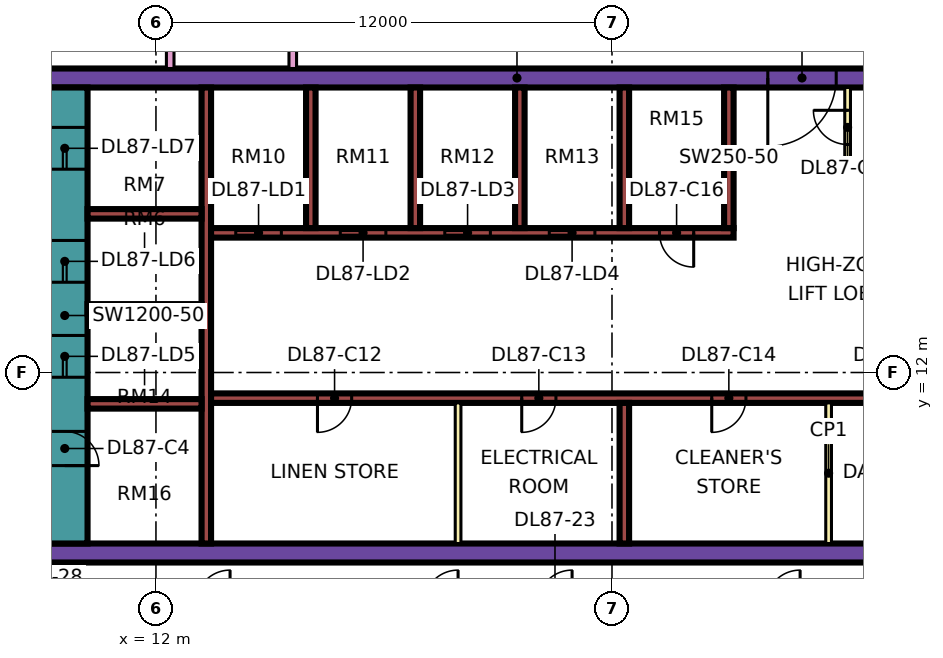
"""IFC4 building model, lengths in metres.
Left out: names, types, materials, properties, quantities, classifications, styles, units other than length and angle.
Written with IfcOpenShell. Run it as: python <this file> out.ifc"""

import sys

from ifc_helpers import new_model, si_unit, direction, frame, frame_2d, origin, place, context, subcontext, project, spatial, rectangle, extrude, element, fill, save


model = new_model("IFC4")
c1 = context("Model", 3, precision=1e-05, world=origin(), true_north=direction((0.0, 1.0)))
c2 = subcontext(c1, "Body", "Model", "MODEL_VIEW")
j1 = project(units=[si_unit("LENGTHUNIT", "METRE"), si_unit("PLANEANGLEUNIT", "RADIAN")], contexts=[c1])
p1 = place(None, origin())
s1 = spatial("IfcSite", under=j1, at=p1, CompositionType="ELEMENT")
p2 = place(p1, origin())
s2 = spatial("IfcBuilding", under=s1, at=p2, CompositionType="ELEMENT")
p3 = place(p2, frame((0.0, 0.0, 372.65)))
s3 = spatial("IfcBuildingStorey", under=s2, at=p3, CompositionType="ELEMENT", Elevation=372.65)
p4 = place(p3, frame((9.0, 7.25, 0.0), z_axis=(0.0, 0.0, 1.0), x_axis=(1.0, 0.0, 0.0)))
e1 = element("IfcWall", 1, at=p4, inside=s3, PredefinedType="SHEAR", context=c2, shape_type="SweptSolid", body=[
    extrude(rectangle(XDim=25.0, YDim=0.5, at=frame_2d((12.5, 0.0))), origin(), (0.0, 0.0, 1.0), 3.75),
])
p5 = place(p3, frame((9.0, 19.75, 0.0), z_axis=(0.0, 0.0, 1.0), x_axis=(1.0, 0.0, 0.0)))
e2 = element("IfcWall", 2, at=p5, inside=s3, PredefinedType="SHEAR", context=c2, shape_type="SweptSolid", body=[
    extrude(rectangle(XDim=25.0, YDim=0.5, at=frame_2d((12.5, 0.0))), origin(), (0.0, 0.0, 1.0), 3.75),
])
p6 = place(p5, frame((19.1, 0.0, 0.0)))
e3 = element("IfcOpeningElement", 3, at=p6, cuts=e2, PredefinedType="OPENING", context=c2, shape_type="SweptSolid", body=[
    extrude(rectangle(XDim=1.8, YDim=2.4, at=frame_2d((0.9, 1.2))), frame((0.0, 0.26, 0.0), z_axis=(0.0, -1.0, 0.0), x_axis=(1.0, 0.0, 0.0)), (0.0, 0.0, 1.0), 0.52),
])
p7 = place(p3, frame((9.6, 7.5, 0.0), z_axis=(0.0, 0.0, 1.0), x_axis=(0.0, 1.0, 0.0)))
e4 = element("IfcWall", 4, at=p7, inside=s3, PredefinedType="SHEAR", context=c2, shape_type="SweptSolid", body=[
    extrude(rectangle(XDim=12.0, YDim=1.2, at=frame_2d((6.0, 0.0))), origin(), (0.0, 0.0, 1.0), 3.75),
])
p8 = place(p7, frame((4.375, 0.0, 0.0)))
e5 = element("IfcOpeningElement", 5, at=p8, cuts=e4, PredefinedType="OPENING", context=c2, shape_type="SweptSolid", body=[
    extrude(rectangle(XDim=1.1, YDim=2.2, at=frame_2d((0.55, 1.1))), frame((0.0, 0.61, 0.0), z_axis=(0.0, -1.0, 0.0), x_axis=(1.0, 0.0, 0.0)), (0.0, 0.0, 1.0), 1.22),
])
p9 = place(p7, frame((6.875, 0.0, 0.0)))
e6 = element("IfcOpeningElement", 6, at=p9, cuts=e4, PredefinedType="OPENING", context=c2, shape_type="SweptSolid", body=[
    extrude(rectangle(XDim=1.1, YDim=2.2, at=frame_2d((0.55, 1.1))), frame((0.0, 0.61, 0.0), z_axis=(0.0, -1.0, 0.0), x_axis=(1.0, 0.0, 0.0)), (0.0, 0.0, 1.0), 1.22),
])
p10 = place(p7, frame((9.85, 0.0, 0.0)))
e7 = element("IfcOpeningElement", 7, at=p10, cuts=e4, PredefinedType="OPENING", context=c2, shape_type="SweptSolid", body=[
    extrude(rectangle(XDim=1.1, YDim=2.2, at=frame_2d((0.55, 1.1))), frame((0.0, 0.61, 0.0), z_axis=(0.0, -1.0, 0.0), x_axis=(1.0, 0.0, 0.0)), (0.0, 0.0, 1.0), 1.22),
])
p11 = place(p7, frame((2.05, 0.0, 0.0)))
e8 = element("IfcOpeningElement", 8, at=p11, cuts=e4, PredefinedType="OPENING", context=c2, shape_type="SweptSolid", body=[
    extrude(rectangle(XDim=0.9, YDim=2.1, at=frame_2d((0.45, 1.05))), frame((0.0, 0.61, 0.0), z_axis=(0.0, -1.0, 0.0), x_axis=(1.0, 0.0, 0.0)), (0.0, 0.0, 1.0), 1.22),
])
p12 = place(p3, frame((13.325, 7.5, 0.0), z_axis=(0.0, 0.0, 1.0), x_axis=(0.0, 1.0, 0.0)))
e9 = element("IfcWall", 9, at=p12, inside=s3, PredefinedType="SHEAR", context=c2, shape_type="SweptSolid", body=[
    extrude(rectangle(XDim=12.0, YDim=0.25, at=frame_2d((6.0, 0.0))), origin(), (0.0, 0.0, 1.0), 3.75),
])
p13 = place(p3, frame((13.45, 11.325, 0.0), z_axis=(0.0, 0.0, 1.0), x_axis=(1.0, 0.0, 0.0)))
e10 = element("IfcWall", 10, at=p13, inside=s3, PredefinedType="SHEAR", context=c2, shape_type="SweptSolid", body=[
    extrude(rectangle(XDim=20.05, YDim=0.25, at=frame_2d((10.025, 0.0))), origin(), (0.0, 0.0, 1.0), 3.75),
])
p14 = place(p13, frame((2.8, 0.0, 0.0)))
e11 = element("IfcOpeningElement", 11, at=p14, cuts=e10, PredefinedType="OPENING", context=c2, shape_type="SweptSolid", body=[
    extrude(rectangle(XDim=0.9, YDim=2.1, at=frame_2d((0.45, 1.05))), frame((0.0, 0.135, 0.0), z_axis=(0.0, -1.0, 0.0), x_axis=(1.0, 0.0, 0.0)), (0.0, 0.0, 1.0), 0.27),
])
p15 = place(p13, frame((8.175, 0.0, 0.0)))
e12 = element("IfcOpeningElement", 12, at=p15, cuts=e10, PredefinedType="OPENING", context=c2, shape_type="SweptSolid", body=[
    extrude(rectangle(XDim=0.9, YDim=2.1, at=frame_2d((0.45, 1.05))), frame((0.0, 0.135, 0.0), z_axis=(0.0, -1.0, 0.0), x_axis=(1.0, 0.0, 0.0)), (0.0, 0.0, 1.0), 0.27),
])
p16 = place(p13, frame((13.175, 0.0, 0.0)))
e13 = element("IfcOpeningElement", 13, at=p16, cuts=e10, PredefinedType="OPENING", context=c2, shape_type="SweptSolid", body=[
    extrude(rectangle(XDim=0.9, YDim=2.1, at=frame_2d((0.45, 1.05))), frame((0.0, 0.135, 0.0), z_axis=(0.0, -1.0, 0.0), x_axis=(1.0, 0.0, 0.0)), (0.0, 0.0, 1.0), 0.27),
])
p17 = place(p13, frame((17.7, 0.0, 0.0)))
e14 = element("IfcOpeningElement", 14, at=p17, cuts=e10, PredefinedType="OPENING", context=c2, shape_type="SweptSolid", body=[
    extrude(rectangle(XDim=0.9, YDim=2.1, at=frame_2d((0.45, 1.05))), frame((0.0, 0.135, 0.0), z_axis=(0.0, -1.0, 0.0), x_axis=(1.0, 0.0, 0.0)), (0.0, 0.0, 1.0), 0.27),
])
p18 = place(p3, frame((13.45, 15.675, 0.0), z_axis=(0.0, 0.0, 1.0), x_axis=(1.0, 0.0, 0.0)))
e15 = element("IfcWall", 15, at=p18, inside=s3, PredefinedType="SHEAR", context=c2, shape_type="SweptSolid", body=[
    extrude(rectangle(XDim=13.75, YDim=0.25, at=frame_2d((6.875, 0.0))), origin(), (0.0, 0.0, 1.0), 3.75),
])
p19 = place(p18, frame((0.65, 0.0, 0.0)))
e16 = element("IfcOpeningElement", 16, at=p19, cuts=e15, PredefinedType="OPENING", context=c2, shape_type="SweptSolid", body=[
    extrude(rectangle(XDim=1.2, YDim=2.2, at=frame_2d((0.6, 1.1))), frame((0.0, 0.135, 0.0), z_axis=(0.0, -1.0, 0.0), x_axis=(1.0, 0.0, 0.0)), (0.0, 0.0, 1.0), 0.27),
])
p20 = place(p18, frame((3.4, 0.0, 0.0)))
e17 = element("IfcOpeningElement", 17, at=p20, cuts=e15, PredefinedType="OPENING", context=c2, shape_type="SweptSolid", body=[
    extrude(rectangle(XDim=1.2, YDim=2.2, at=frame_2d((0.6, 1.1))), frame((0.0, 0.135, 0.0), z_axis=(0.0, -1.0, 0.0), x_axis=(1.0, 0.0, 0.0)), (0.0, 0.0, 1.0), 0.27),
])
p21 = place(p18, frame((6.15, 0.0, 0.0)))
e18 = element("IfcOpeningElement", 18, at=p21, cuts=e15, PredefinedType="OPENING", context=c2, shape_type="SweptSolid", body=[
    extrude(rectangle(XDim=1.2, YDim=2.2, at=frame_2d((0.6, 1.1))), frame((0.0, 0.135, 0.0), z_axis=(0.0, -1.0, 0.0), x_axis=(1.0, 0.0, 0.0)), (0.0, 0.0, 1.0), 0.27),
])
p22 = place(p18, frame((8.9, 0.0, 0.0)))
e19 = element("IfcOpeningElement", 19, at=p22, cuts=e15, PredefinedType="OPENING", context=c2, shape_type="SweptSolid", body=[
    extrude(rectangle(XDim=1.2, YDim=2.2, at=frame_2d((0.6, 1.1))), frame((0.0, 0.135, 0.0), z_axis=(0.0, -1.0, 0.0), x_axis=(1.0, 0.0, 0.0)), (0.0, 0.0, 1.0), 0.27),
])
p23 = place(p18, frame((11.8, 0.0, 0.0)))
e20 = element("IfcOpeningElement", 20, at=p23, cuts=e15, PredefinedType="OPENING", context=c2, shape_type="SweptSolid", body=[
    extrude(rectangle(XDim=0.9, YDim=2.1, at=frame_2d((0.45, 1.05))), frame((0.0, 0.135, 0.0), z_axis=(0.0, -1.0, 0.0), x_axis=(1.0, 0.0, 0.0)), (0.0, 0.0, 1.0), 0.27),
])
for number, where, z_axis, x_axis in (
    (21, (10.2, 11.175, 0.0), (0.0, 0.0, 1.0), (1.0, 0.0, 0.0)),
    (22, (10.2, 13.675, 0.0), (0.0, 0.0, 1.0), (1.0, 0.0, 0.0)),
    (23, (10.2, 16.175, 0.0), (0.0, 0.0, 1.0), (1.0, 0.0, 0.0)),
):
    element("IfcWall", number, at=place(p3, frame(where, z_axis=z_axis, x_axis=x_axis)), inside=s3, PredefinedType="SHEAR", context=c2, shape_type="SweptSolid", body=[
        extrude(rectangle(XDim=3.0, YDim=0.25, at=frame_2d((1.5, 0.0))), origin(), (0.0, 0.0, 1.0), 3.75),
    ])
for number, where, z_axis, x_axis in (
    (24, (24.325, 7.5, 0.0), (0.0, 0.0, 1.0), (0.0, 1.0, 0.0)),
    (25, (16.075, 15.8, 0.0), (0.0, 0.0, 1.0), (0.0, 1.0, 0.0)),
    (26, (18.825, 15.8, 0.0), (0.0, 0.0, 1.0), (0.0, 1.0, 0.0)),
    (27, (21.575, 15.8, 0.0), (0.0, 0.0, 1.0), (0.0, 1.0, 0.0)),
    (28, (24.325, 15.8, 0.0), (0.0, 0.0, 1.0), (0.0, 1.0, 0.0)),
    (29, (27.075, 15.8, 0.0), (0.0, 0.0, 1.0), (0.0, 1.0, 0.0)),
):
    element("IfcWall", number, at=place(p3, frame(where, z_axis=z_axis, x_axis=x_axis)), inside=s3, PredefinedType="SHEAR", context=c2, shape_type="SweptSolid", body=[
        extrude(rectangle(XDim=3.7, YDim=0.25, at=frame_2d((1.85, 0.0))), origin(), (0.0, 0.0, 1.0), 3.75),
    ])
p24 = place(p3, frame((-1.447, 12.553, 0.0), z_axis=(0.0, 0.0, 1.0), x_axis=(0.707106781187, -0.707106781187, 0.0)))
e30 = element("IfcWall", 30, at=p24, inside=s3, PredefinedType="SOLIDWALL", context=c2, shape_type="SweptSolid", body=[
    extrude(rectangle(XDim=19.799, YDim=0.15, at=frame_2d((9.899, 0.0))), origin(), (0.0, 0.0, 1.0), 3.35),
])
p25 = place(p24, frame((2.212, 0.0, 0.45)))
e31 = element("IfcOpeningElement", 31, at=p25, cuts=e30, PredefinedType="OPENING", context=c2, shape_type="SweptSolid", body=[
    extrude(rectangle(XDim=3.0, YDim=2.4, at=frame_2d((1.5, 1.2))), frame((0.0, 0.085, 0.0), z_axis=(0.0, -1.0, 0.0), x_axis=(1.0, 0.0, 0.0)), (0.0, 0.0, 1.0), 0.17),
])
p26 = place(p24, frame((10.216, 0.0, 0.45)))
e32 = element("IfcOpeningElement", 32, at=p26, cuts=e30, PredefinedType="OPENING", context=c2, shape_type="SweptSolid", body=[
    extrude(rectangle(XDim=3.0, YDim=2.4, at=frame_2d((1.5, 1.2))), frame((0.0, 0.085, 0.0), z_axis=(0.0, -1.0, 0.0), x_axis=(1.0, 0.0, 0.0)), (0.0, 0.0, 1.0), 0.17),
])
for number, where, z_axis, x_axis in (
    (33, (19.95, 7.5, 0.0), (0.0, 0.0, 1.0), (0.0, 1.0, 0.0)),
    (34, (29.7, 7.5, 0.0), (0.0, 0.0, 1.0), (0.0, 1.0, 0.0)),
):
    element("IfcWall", number, at=place(p3, frame(where, z_axis=z_axis, x_axis=x_axis)), inside=s3, PredefinedType="PARTITIONING", context=c2, shape_type="SweptSolid", body=[
        extrude(rectangle(XDim=3.7, YDim=0.15, at=frame_2d((1.85, 0.0))), origin(), (0.0, 0.0, 1.0), 3.35),
    ])
p27 = place(p3, frame((30.2, 17.5, 0.0), z_axis=(0.0, 0.0, 1.0), x_axis=(0.0, 1.0, 0.0)))
e35 = element("IfcWall", 35, at=p27, inside=s3, PredefinedType="PARTITIONING", context=c2, shape_type="SweptSolid", body=[
    extrude(rectangle(XDim=2.0, YDim=0.15, at=frame_2d((1.0, 0.0))), origin(), (0.0, 0.0, 1.0), 3.35),
])
p28 = place(p27, frame((0.5, 0.0, 0.0)))
e36 = element("IfcOpeningElement", 36, at=p28, cuts=e35, PredefinedType="OPENING", context=c2, shape_type="SweptSolid", body=[
    extrude(rectangle(XDim=0.9, YDim=2.1, at=frame_2d((0.45, 1.05))), frame((0.0, 0.085, 0.0), z_axis=(0.0, -1.0, 0.0), x_axis=(1.0, 0.0, 0.0)), (0.0, 0.0, 1.0), 0.17),
])
p29 = place(p3, frame((30.2, 17.5, 0.0), z_axis=(0.0, 0.0, 1.0), x_axis=(1.0, 0.0, 0.0)))
e37 = element("IfcWall", 37, at=p29, inside=s3, PredefinedType="PARTITIONING", context=c2, shape_type="SweptSolid", body=[
    extrude(rectangle(XDim=3.3, YDim=0.15, at=frame_2d((1.65, 0.0))), origin(), (0.0, 0.0, 1.0), 3.35),
])
p30 = place(p3, frame((12.375, 20.0, 0.0), z_axis=(0.0, 0.0, 1.0), x_axis=(0.0, 1.0, 0.0)))
e38 = element("IfcWall", 38, at=p30, inside=s3, PredefinedType="PARTITIONING", context=c2, shape_type="SweptSolid", body=[
    extrude(rectangle(XDim=34.0, YDim=0.2, at=frame_2d((17.0, 0.0))), origin(), (0.0, 0.0, 1.0), 3.35),
])
p31 = place(p30, frame((16.8, 0.0, 0.0)))
e39 = element("IfcOpeningElement", 39, at=p31, cuts=e38, PredefinedType="OPENING", context=c2, shape_type="SweptSolid", body=[
    extrude(rectangle(XDim=1.0, YDim=2.1, at=frame_2d((0.5, 1.05))), frame((0.0, 0.11, 0.0), z_axis=(0.0, -1.0, 0.0), x_axis=(1.0, 0.0, 0.0)), (0.0, 0.0, 1.0), 0.22),
])
p32 = place(p30, frame((0.6, 0.0, 0.0)))
e40 = element("IfcOpeningElement", 40, at=p32, cuts=e38, PredefinedType="OPENING", context=c2, shape_type="SweptSolid", body=[
    extrude(rectangle(XDim=1.2, YDim=2.1, at=frame_2d((0.6, 1.05))), frame((0.0, 0.11, 0.0), z_axis=(0.0, -1.0, 0.0), x_axis=(1.0, 0.0, 0.0)), (0.0, 0.0, 1.0), 0.22),
])
p33 = place(p30, frame((4.5, 0.0, 0.0)))
e41 = element("IfcOpeningElement", 41, at=p33, cuts=e38, PredefinedType="OPENING", context=c2, shape_type="SweptSolid", body=[
    extrude(rectangle(XDim=1.0, YDim=2.1, at=frame_2d((0.5, 1.05))), frame((0.0, 0.11, 0.0), z_axis=(0.0, -1.0, 0.0), x_axis=(1.0, 0.0, 0.0)), (0.0, 0.0, 1.0), 0.22),
])
p34 = place(p3, frame((15.6, 20.0, 0.0), z_axis=(0.0, 0.0, 1.0), x_axis=(0.0, 1.0, 0.0)))
e42 = element("IfcWall", 42, at=p34, inside=s3, PredefinedType="PARTITIONING", context=c2, shape_type="SweptSolid", body=[
    extrude(rectangle(XDim=27.775, YDim=0.2, at=frame_2d((13.887, 0.0))), origin(), (0.0, 0.0, 1.0), 3.35),
])
p35 = place(p34, frame((7.15, 0.0, 0.0)))
e43 = element("IfcOpeningElement", 43, at=p35, cuts=e42, PredefinedType="OPENING", context=c2, shape_type="SweptSolid", body=[
    extrude(rectangle(XDim=1.6, YDim=2.1, at=frame_2d((0.8, 1.05))), frame((0.0, 0.11, 0.0), z_axis=(0.0, -1.0, 0.0), x_axis=(1.0, 0.0, 0.0)), (0.0, 0.0, 1.0), 0.22),
])
p36 = place(p34, frame((13.5, 0.0, 0.0)))
e44 = element("IfcOpeningElement", 44, at=p36, cuts=e42, PredefinedType="OPENING", context=c2, shape_type="SweptSolid", body=[
    extrude(rectangle(XDim=1.0, YDim=2.1, at=frame_2d((0.5, 1.05))), frame((0.0, 0.11, 0.0), z_axis=(0.0, -1.0, 0.0), x_axis=(1.0, 0.0, 0.0)), (0.0, 0.0, 1.0), 0.22),
])
p37 = place(p34, frame((23.35, 0.0, 0.0)))
e45 = element("IfcOpeningElement", 45, at=p37, cuts=e42, PredefinedType="OPENING", context=c2, shape_type="SweptSolid", body=[
    extrude(rectangle(XDim=1.0, YDim=2.1, at=frame_2d((0.5, 1.05))), frame((0.0, 0.11, 0.0), z_axis=(0.0, -1.0, 0.0), x_axis=(1.0, 0.0, 0.0)), (0.0, 0.0, 1.0), 0.22),
])
p38 = place(p34, frame((1.15, 0.0, 0.0)))
e46 = element("IfcOpeningElement", 46, at=p38, cuts=e42, PredefinedType="OPENING", context=c2, shape_type="SweptSolid", body=[
    extrude(rectangle(XDim=1.8, YDim=2.1, at=frame_2d((0.9, 1.05))), frame((0.0, 0.11, 0.0), z_axis=(0.0, -1.0, 0.0), x_axis=(1.0, 0.0, 0.0)), (0.0, 0.0, 1.0), 0.22),
])
p39 = place(p34, frame((25.9, 0.0, 0.0)))
e47 = element("IfcOpeningElement", 47, at=p39, cuts=e42, PredefinedType="OPENING", context=c2, shape_type="SweptSolid", body=[
    extrude(rectangle(XDim=1.0, YDim=2.1, at=frame_2d((0.5, 1.05))), frame((0.0, 0.11, 0.0), z_axis=(0.0, -1.0, 0.0), x_axis=(1.0, 0.0, 0.0)), (0.0, 0.0, 1.0), 0.22),
])
p40 = place(p19, origin())
e48 = element("IfcDoor", 48, at=p40, inside=s3, OperationType="DOUBLE_DOOR_SLIDING", PredefinedType="DOOR", context=c2, shape_type="SweptSolid", body=[
    extrude(rectangle(XDim=1.2, YDim=2.2, at=frame_2d((0.6, 1.1))), frame((0.0, 0.025, 0.0), z_axis=(0.0, -1.0, 0.0), x_axis=(1.0, 0.0, 0.0)), (0.0, 0.0, 1.0), 0.05),
])
fill(e16, e48)
p41 = place(p20, origin())
e49 = element("IfcDoor", 49, at=p41, inside=s3, OperationType="DOUBLE_DOOR_SLIDING", PredefinedType="DOOR", context=c2, shape_type="SweptSolid", body=[
    extrude(rectangle(XDim=1.2, YDim=2.2, at=frame_2d((0.6, 1.1))), frame((0.0, 0.025, 0.0), z_axis=(0.0, -1.0, 0.0), x_axis=(1.0, 0.0, 0.0)), (0.0, 0.0, 1.0), 0.05),
])
fill(e17, e49)
p42 = place(p21, origin())
e50 = element("IfcDoor", 50, at=p42, inside=s3, OperationType="DOUBLE_DOOR_SLIDING", PredefinedType="DOOR", context=c2, shape_type="SweptSolid", body=[
    extrude(rectangle(XDim=1.2, YDim=2.2, at=frame_2d((0.6, 1.1))), frame((0.0, 0.025, 0.0), z_axis=(0.0, -1.0, 0.0), x_axis=(1.0, 0.0, 0.0)), (0.0, 0.0, 1.0), 0.05),
])
fill(e18, e50)
p43 = place(p22, origin())
e51 = element("IfcDoor", 51, at=p43, inside=s3, OperationType="DOUBLE_DOOR_SLIDING", PredefinedType="DOOR", context=c2, shape_type="SweptSolid", body=[
    extrude(rectangle(XDim=1.2, YDim=2.2, at=frame_2d((0.6, 1.1))), frame((0.0, 0.025, 0.0), z_axis=(0.0, -1.0, 0.0), x_axis=(1.0, 0.0, 0.0)), (0.0, 0.0, 1.0), 0.05),
])
fill(e19, e51)
p44 = place(p8, origin())
e52 = element("IfcDoor", 52, at=p44, inside=s3, OperationType="DOUBLE_DOOR_SLIDING", PredefinedType="DOOR", context=c2, shape_type="SweptSolid", body=[
    extrude(rectangle(XDim=1.1, YDim=2.2, at=frame_2d((0.55, 1.1))), frame((0.0, 0.025, 0.0), z_axis=(0.0, -1.0, 0.0), x_axis=(1.0, 0.0, 0.0)), (0.0, 0.0, 1.0), 0.05),
])
fill(e5, e52)
p45 = place(p9, origin())
e53 = element("IfcDoor", 53, at=p45, inside=s3, OperationType="DOUBLE_DOOR_SLIDING", PredefinedType="DOOR", context=c2, shape_type="SweptSolid", body=[
    extrude(rectangle(XDim=1.1, YDim=2.2, at=frame_2d((0.55, 1.1))), frame((0.0, 0.025, 0.0), z_axis=(0.0, -1.0, 0.0), x_axis=(1.0, 0.0, 0.0)), (0.0, 0.0, 1.0), 0.05),
])
fill(e6, e53)
p46 = place(p10, origin())
e54 = element("IfcDoor", 54, at=p46, inside=s3, OperationType="DOUBLE_DOOR_SLIDING", PredefinedType="DOOR", context=c2, shape_type="SweptSolid", body=[
    extrude(rectangle(XDim=1.1, YDim=2.2, at=frame_2d((0.55, 1.1))), frame((0.0, 0.025, 0.0), z_axis=(0.0, -1.0, 0.0), x_axis=(1.0, 0.0, 0.0)), (0.0, 0.0, 1.0), 0.05),
])
fill(e7, e54)
p47 = place(p6, frame((1.8, 0.0, 0.0), z_axis=(0.0, 0.0, 1.0), x_axis=(-1.0, 0.0, 0.0)))
e55 = element("IfcDoor", 55, at=p47, inside=s3, OperationType="DOUBLE_DOOR_SINGLE_SWING", PredefinedType="DOOR", context=c2, shape_type="SweptSolid", body=[
    extrude(rectangle(XDim=1.8, YDim=2.4, at=frame_2d((0.9, 1.2))), frame((0.0, 0.025, 0.0), z_axis=(0.0, -1.0, 0.0), x_axis=(1.0, 0.0, 0.0)), (0.0, 0.0, 1.0), 0.05),
])
fill(e3, e55)
p48 = place(p11, frame((0.9, 0.0, 0.0), z_axis=(0.0, 0.0, 1.0), x_axis=(-1.0, 0.0, 0.0)))
e56 = element("IfcDoor", 56, at=p48, inside=s3, OperationType="SINGLE_SWING_LEFT", PredefinedType="DOOR", context=c2, shape_type="SweptSolid", body=[
    extrude(rectangle(XDim=0.9, YDim=2.1, at=frame_2d((0.45, 1.05))), frame((0.0, 0.025, 0.0), z_axis=(0.0, -1.0, 0.0), x_axis=(1.0, 0.0, 0.0)), (0.0, 0.0, 1.0), 0.05),
])
fill(e8, e56)
p49 = place(p14, frame((0.9, 0.0, 0.0), z_axis=(0.0, 0.0, 1.0), x_axis=(-1.0, 0.0, 0.0)))
e57 = element("IfcDoor", 57, at=p49, inside=s3, OperationType="SINGLE_SWING_LEFT", PredefinedType="DOOR", context=c2, shape_type="SweptSolid", body=[
    extrude(rectangle(XDim=0.9, YDim=2.1, at=frame_2d((0.45, 1.05))), frame((0.0, 0.025, 0.0), z_axis=(0.0, -1.0, 0.0), x_axis=(1.0, 0.0, 0.0)), (0.0, 0.0, 1.0), 0.05),
])
fill(e11, e57)
p50 = place(p15, frame((0.9, 0.0, 0.0), z_axis=(0.0, 0.0, 1.0), x_axis=(-1.0, 0.0, 0.0)))
e58 = element("IfcDoor", 58, at=p50, inside=s3, OperationType="SINGLE_SWING_LEFT", PredefinedType="DOOR", context=c2, shape_type="SweptSolid", body=[
    extrude(rectangle(XDim=0.9, YDim=2.1, at=frame_2d((0.45, 1.05))), frame((0.0, 0.025, 0.0), z_axis=(0.0, -1.0, 0.0), x_axis=(1.0, 0.0, 0.0)), (0.0, 0.0, 1.0), 0.05),
])
fill(e12, e58)
p51 = place(p16, frame((0.9, 0.0, 0.0), z_axis=(0.0, 0.0, 1.0), x_axis=(-1.0, 0.0, 0.0)))
e59 = element("IfcDoor", 59, at=p51, inside=s3, OperationType="SINGLE_SWING_LEFT", PredefinedType="DOOR", context=c2, shape_type="SweptSolid", body=[
    extrude(rectangle(XDim=0.9, YDim=2.1, at=frame_2d((0.45, 1.05))), frame((0.0, 0.025, 0.0), z_axis=(0.0, -1.0, 0.0), x_axis=(1.0, 0.0, 0.0)), (0.0, 0.0, 1.0), 0.05),
])
fill(e13, e59)
p52 = place(p23, origin())
e60 = element("IfcDoor", 60, at=p52, inside=s3, OperationType="SINGLE_SWING_RIGHT", PredefinedType="DOOR", context=c2, shape_type="SweptSolid", body=[
    extrude(rectangle(XDim=0.9, YDim=2.1, at=frame_2d((0.45, 1.05))), frame((0.0, 0.025, 0.0), z_axis=(0.0, -1.0, 0.0), x_axis=(1.0, 0.0, 0.0)), (0.0, 0.0, 1.0), 0.05),
])
fill(e20, e60)
p53 = place(p28, frame((0.9, 0.0, 0.0), z_axis=(0.0, 0.0, 1.0), x_axis=(-1.0, 0.0, 0.0)))
e61 = element("IfcDoor", 61, at=p53, inside=s3, OperationType="SINGLE_SWING_RIGHT", PredefinedType="DOOR", context=c2, shape_type="SweptSolid", body=[
    extrude(rectangle(XDim=0.9, YDim=2.1, at=frame_2d((0.45, 1.05))), frame((0.0, 0.025, 0.0), z_axis=(0.0, -1.0, 0.0), x_axis=(1.0, 0.0, 0.0)), (0.0, 0.0, 1.0), 0.05),
])
fill(e36, e61)
save(model, sys.argv[1])
